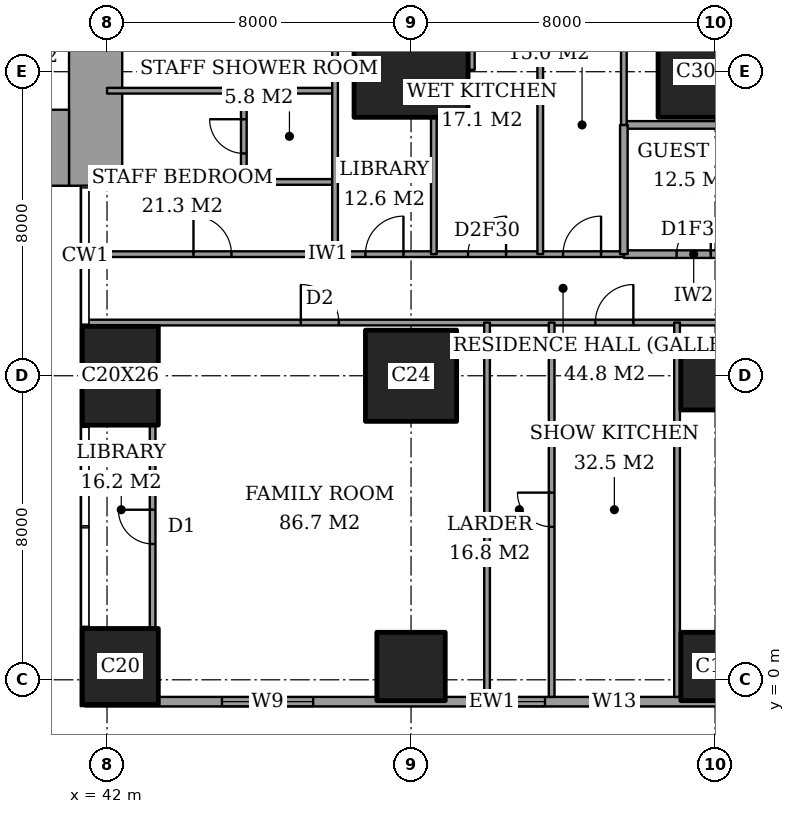
"""IFC4 building model, lengths in metres.
Left out: names, types, materials, properties, quantities, classifications, styles, units other than length and angle.
Written with IfcOpenShell. Run it as: python <this file> out.ifc"""

import sys

from ifc_helpers import new_model, si_unit, direction, frame, frame_2d, origin, origin_2d, place, context, subcontext, project, spatial, rectangle, extrude, element, fill, save


model = new_model("IFC4")
c1 = context("Model", 3, precision=1e-05, world=origin(), true_north=direction((0.0, 1.0)))
c2 = subcontext(c1, "Body", "Model", "MODEL_VIEW")
j1 = project(units=[si_unit("LENGTHUNIT", "METRE"), si_unit("PLANEANGLEUNIT", "RADIAN")], contexts=[c1])
p1 = place(None, origin())
s1 = spatial("IfcSite", under=j1, at=p1, CompositionType="ELEMENT")
p2 = place(p1, origin())
s2 = spatial("IfcBuilding", under=s1, at=p2, CompositionType="ELEMENT")
p3 = place(p2, frame((0.0, 0.0, 185.8)))
s3 = spatial("IfcBuildingStorey", under=s2, at=p3, CompositionType="ELEMENT", Elevation=185.8)
p4 = place(p3, frame((42.35, 0.35, 0.0), z_axis=(0.0, 0.0, 1.0), x_axis=(1.0, 0.0, 0.0)))
e1 = element("IfcColumn", 1, at=p4, inside=s3, PredefinedType="COLUMN", context=c2, shape_type="SweptSolid", body=[
    extrude(rectangle(XDim=2.0, YDim=2.0, at=origin_2d()), origin(), (0.0, 0.0, 1.0), 3.6),
])
p5 = place(p3, frame((42.35, 8.0, 0.0), z_axis=(0.0, 0.0, 1.0), x_axis=(1.0, 0.0, 0.0)))
e2 = element("IfcColumn", 2, at=p5, inside=s3, PredefinedType="COLUMN", context=c2, shape_type="SweptSolid", body=[
    extrude(rectangle(XDim=2.0, YDim=2.6, at=origin_2d()), origin(), (0.0, 0.0, 1.0), 3.6),
])
p6 = place(p3, frame((50.0, 0.35, 0.0), z_axis=(0.0, 0.0, 1.0), x_axis=(1.0, 0.0, 0.0)))
e3 = element("IfcColumn", 3, at=p6, inside=s3, PredefinedType="COLUMN", context=c2, shape_type="SweptSolid", body=[
    extrude(rectangle(XDim=1.8, YDim=1.8, at=origin_2d()), origin(), (0.0, 0.0, 1.0), 3.6),
])
p7 = place(p3, frame((50.0, 8.0, 0.0), z_axis=(0.0, 0.0, 1.0), x_axis=(1.0, 0.0, 0.0)))
e4 = element("IfcColumn", 4, at=p7, inside=s3, PredefinedType="COLUMN", context=c2, shape_type="SweptSolid", body=[
    extrude(rectangle(XDim=2.4, YDim=2.4, at=origin_2d()), origin(), (0.0, 0.0, 1.0), 3.6),
])
p8 = place(p3, frame((50.0, 16.0, 0.0), z_axis=(0.0, 0.0, 1.0), x_axis=(1.0, 0.0, 0.0)))
e5 = element("IfcColumn", 5, at=p8, inside=s3, PredefinedType="COLUMN", context=c2, shape_type="SweptSolid", body=[
    extrude(rectangle(XDim=3.0, YDim=2.4, at=origin_2d()), origin(), (0.0, 0.0, 1.0), 3.6),
])
for number, where, z_axis, x_axis in (
    (6, (58.0, 0.35, 0.0), (0.0, 0.0, 1.0), (1.0, 0.0, 0.0)),
    (7, (58.0, 8.0, 0.0), (0.0, 0.0, 1.0), (1.0, 0.0, 0.0)),
):
    element("IfcColumn", number, at=place(p3, frame(where, z_axis=z_axis, x_axis=x_axis)), inside=s3, PredefinedType="COLUMN", context=c2, shape_type="SweptSolid", body=[
        extrude(rectangle(XDim=1.8, YDim=1.8, at=origin_2d()), origin(), (0.0, 0.0, 1.0), 3.6),
    ])
p9 = place(p3, frame((58.0, 16.0, 0.0), z_axis=(0.0, 0.0, 1.0), x_axis=(1.0, 0.0, 0.0)))
e8 = element("IfcColumn", 8, at=p9, inside=s3, PredefinedType="COLUMN", context=c2, shape_type="SweptSolid", body=[
    extrude(rectangle(XDim=3.0, YDim=2.4, at=origin_2d()), origin(), (0.0, 0.0, 1.0), 3.6),
])
p10 = place(p3, frame((37.85, 14.0, 0.0), z_axis=(0.0, 0.0, 1.0), x_axis=(1.0, 0.0, 0.0)))
e9 = element("IfcWall", 9, at=p10, inside=s3, PredefinedType="SHEAR", context=c2, shape_type="SweptSolid", body=[
    extrude(rectangle(XDim=3.15, YDim=2.0, at=frame_2d((1.575, 0.0))), origin(), (0.0, 0.0, 1.0), 3.6),
])
p11 = place(p3, frame((41.7, 13.0, 0.0), z_axis=(0.0, 0.0, 1.0), x_axis=(0.0, 1.0, 0.0)))
e10 = element("IfcWall", 10, at=p11, inside=s3, PredefinedType="SHEAR", context=c2, shape_type="SweptSolid", body=[
    extrude(rectangle(XDim=11.85, YDim=1.4, at=frame_2d((5.925, 0.0))), origin(), (0.0, 0.0, 1.0), 3.6),
])
p12 = place(p11, frame((7.5, 0.0, 0.0)))
e11 = element("IfcOpeningElement", 11, at=p12, cuts=e10, PredefinedType="OPENING", context=c2, shape_type="SweptSolid", body=[
    extrude(rectangle(XDim=1.8, YDim=2.4, at=frame_2d((0.9, 1.2))), frame((0.0, 0.71, 0.0), z_axis=(0.0, -1.0, 0.0), x_axis=(1.0, 0.0, 0.0)), (0.0, 0.0, 1.0), 1.42),
])
p13 = place(p3, frame((41.425, -0.575, 0.0), z_axis=(0.0, 0.0, 1.0), x_axis=(1.0, 0.0, 0.0)))
e12 = element("IfcWall", 12, at=p13, inside=s3, PredefinedType="SOLIDWALL", context=c2, shape_type="SweptSolid", body=[
    extrude(rectangle(XDim=21.4, YDim=0.25, at=frame_2d((10.7, 0.0))), origin(), (0.0, 0.0, 1.0), 3.6),
])
p14 = place(p13, frame((3.6, 0.0, 0.2)))
e13 = element("IfcOpeningElement", 13, at=p14, cuts=e12, PredefinedType="OPENING", context=c2, shape_type="SweptSolid", body=[
    extrude(rectangle(XDim=2.4, YDim=2.4, at=frame_2d((1.2, 1.2))), frame((0.0, 0.135, 0.0), z_axis=(0.0, -1.0, 0.0), x_axis=(1.0, 0.0, 0.0)), (0.0, 0.0, 1.0), 0.27),
])
p15 = place(p13, frame((10.9, 0.0, 0.2)))
e14 = element("IfcOpeningElement", 14, at=p15, cuts=e12, PredefinedType="OPENING", context=c2, shape_type="SweptSolid", body=[
    extrude(rectangle(XDim=1.2, YDim=2.4, at=frame_2d((0.6, 1.2))), frame((0.0, 0.135, 0.0), z_axis=(0.0, -1.0, 0.0), x_axis=(1.0, 0.0, 0.0)), (0.0, 0.0, 1.0), 0.27),
])
p16 = place(p13, frame((13.325, 0.0, 0.2)))
e15 = element("IfcOpeningElement", 15, at=p16, cuts=e12, PredefinedType="OPENING", context=c2, shape_type="SweptSolid", body=[
    extrude(rectangle(XDim=1.2, YDim=2.4, at=frame_2d((0.6, 1.2))), frame((0.0, 0.135, 0.0), z_axis=(0.0, -1.0, 0.0), x_axis=(1.0, 0.0, 0.0)), (0.0, 0.0, 1.0), 0.27),
])
p17 = place(p13, frame((18.175, 0.0, 0.2)))
e16 = element("IfcOpeningElement", 16, at=p17, cuts=e12, PredefinedType="OPENING", context=c2, shape_type="SweptSolid", body=[
    extrude(rectangle(XDim=2.4, YDim=2.4, at=frame_2d((1.2, 1.2))), frame((0.0, 0.135, 0.0), z_axis=(0.0, -1.0, 0.0), x_axis=(1.0, 0.0, 0.0)), (0.0, 0.0, 1.0), 0.27),
])
p18 = place(p3, frame((41.439, 9.4, 0.0), z_axis=(0.0, 0.0, 1.0), x_axis=(1.0, 0.0, 0.0)))
e17 = element("IfcWall", 17, at=p18, inside=s3, PredefinedType="PARTITIONING", context=c2, shape_type="SweptSolid", body=[
    extrude(rectangle(XDim=25.011, YDim=0.15, at=frame_2d((12.505, 0.0))), origin(), (0.0, 0.0, 1.0), 3.35),
])
p19 = place(p18, frame((19.786, 0.0, 0.0)))
e18 = element("IfcOpeningElement", 18, at=p19, cuts=e17, PredefinedType="OPENING", context=c2, shape_type="SweptSolid", body=[
    extrude(rectangle(XDim=1.0, YDim=2.1, at=frame_2d((0.5, 1.05))), frame((0.0, 0.085, 0.0), z_axis=(0.0, -1.0, 0.0), x_axis=(1.0, 0.0, 0.0)), (0.0, 0.0, 1.0), 0.17),
])
p20 = place(p18, frame((13.411, 0.0, 0.0)))
e19 = element("IfcOpeningElement", 19, at=p20, cuts=e17, PredefinedType="OPENING", context=c2, shape_type="SweptSolid", body=[
    extrude(rectangle(XDim=1.0, YDim=2.1, at=frame_2d((0.5, 1.05))), frame((0.0, 0.085, 0.0), z_axis=(0.0, -1.0, 0.0), x_axis=(1.0, 0.0, 0.0)), (0.0, 0.0, 1.0), 0.17),
])
p21 = place(p18, frame((5.661, 0.0, 0.0)))
e20 = element("IfcOpeningElement", 20, at=p21, cuts=e17, PredefinedType="OPENING", context=c2, shape_type="SweptSolid", body=[
    extrude(rectangle(XDim=1.0, YDim=2.1, at=frame_2d((0.5, 1.05))), frame((0.0, 0.085, 0.0), z_axis=(0.0, -1.0, 0.0), x_axis=(1.0, 0.0, 0.0)), (0.0, 0.0, 1.0), 0.17),
])
p22 = place(p3, frame((55.6, 11.2, 0.0), z_axis=(0.0, 0.0, 1.0), x_axis=(1.0, 0.0, 0.0)))
e21 = element("IfcWall", 21, at=p22, inside=s3, PredefinedType="PARTITIONING", context=c2, shape_type="SweptSolid", body=[
    extrude(rectangle(XDim=3.675, YDim=0.2, at=frame_2d((1.837, 0.0))), origin(), (0.0, 0.0, 1.0), 3.35),
])
p23 = place(p22, frame((1.387, 0.0, 0.0)))
e22 = element("IfcOpeningElement", 22, at=p23, cuts=e21, PredefinedType="OPENING", context=c2, shape_type="SweptSolid", body=[
    extrude(rectangle(XDim=0.9, YDim=2.1, at=frame_2d((0.45, 1.05))), frame((0.0, 0.11, 0.0), z_axis=(0.0, -1.0, 0.0), x_axis=(1.0, 0.0, 0.0)), (0.0, 0.0, 1.0), 0.22),
])
p24 = place(p3, frame((41.439, 11.2, 0.0), z_axis=(0.0, 0.0, 1.0), x_axis=(1.0, 0.0, 0.0)))
e23 = element("IfcWall", 23, at=p24, inside=s3, PredefinedType="PARTITIONING", context=c2, shape_type="SweptSolid", body=[
    extrude(rectangle(XDim=14.161, YDim=0.15, at=frame_2d((7.081, 0.0))), origin(), (0.0, 0.0, 1.0), 3.35),
])
p25 = place(p24, frame((12.561, 0.0, 0.0)))
e24 = element("IfcOpeningElement", 24, at=p25, cuts=e23, PredefinedType="OPENING", context=c2, shape_type="SweptSolid", body=[
    extrude(rectangle(XDim=1.0, YDim=2.1, at=frame_2d((0.5, 1.05))), frame((0.0, 0.085, 0.0), z_axis=(0.0, -1.0, 0.0), x_axis=(1.0, 0.0, 0.0)), (0.0, 0.0, 1.0), 0.17),
])
p26 = place(p24, frame((10.061, 0.0, 0.0)))
e25 = element("IfcOpeningElement", 25, at=p26, cuts=e23, PredefinedType="OPENING", context=c2, shape_type="SweptSolid", body=[
    extrude(rectangle(XDim=1.0, YDim=2.1, at=frame_2d((0.5, 1.05))), frame((0.0, 0.085, 0.0), z_axis=(0.0, -1.0, 0.0), x_axis=(1.0, 0.0, 0.0)), (0.0, 0.0, 1.0), 0.17),
])
p27 = place(p24, frame((7.361, 0.0, 0.0)))
e26 = element("IfcOpeningElement", 26, at=p27, cuts=e23, PredefinedType="OPENING", context=c2, shape_type="SweptSolid", body=[
    extrude(rectangle(XDim=1.0, YDim=2.1, at=frame_2d((0.5, 1.05))), frame((0.0, 0.085, 0.0), z_axis=(0.0, -1.0, 0.0), x_axis=(1.0, 0.0, 0.0)), (0.0, 0.0, 1.0), 0.17),
])
p28 = place(p24, frame((2.836, 0.0, 0.0)))
e27 = element("IfcOpeningElement", 27, at=p28, cuts=e23, PredefinedType="OPENING", context=c2, shape_type="SweptSolid", body=[
    extrude(rectangle(XDim=1.0, YDim=2.1, at=frame_2d((0.5, 1.05))), frame((0.0, 0.085, 0.0), z_axis=(0.0, -1.0, 0.0), x_axis=(1.0, 0.0, 0.0)), (0.0, 0.0, 1.0), 0.17),
])
p29 = place(p3, frame((45.6, 13.1, 0.0), z_axis=(0.0, 0.0, 1.0), x_axis=(1.0, 0.0, 0.0)))
e28 = element("IfcWall", 28, at=p29, inside=s3, PredefinedType="PARTITIONING", context=c2, shape_type="SweptSolid", body=[
    extrude(rectangle(XDim=2.4, YDim=0.15, at=frame_2d((1.2, 0.0))), origin(), (0.0, 0.0, 1.0), 3.35),
])
p30 = place(p3, frame((55.6, 14.6, 0.0), z_axis=(0.0, 0.0, 1.0), x_axis=(1.0, 0.0, 0.0)))
e29 = element("IfcWall", 29, at=p30, inside=s3, PredefinedType="PARTITIONING", context=c2, shape_type="SweptSolid", body=[
    extrude(rectangle(XDim=3.675, YDim=0.2, at=frame_2d((1.837, 0.0))), origin(), (0.0, 0.0, 1.0), 3.35),
])
p31 = place(p3, frame((42.0, 15.5, 0.0), z_axis=(0.0, 0.0, 1.0), x_axis=(1.0, 0.0, 0.0)))
e30 = element("IfcWall", 30, at=p31, inside=s3, PredefinedType="PARTITIONING", context=c2, shape_type="SweptSolid", body=[
    extrude(rectangle(XDim=6.0, YDim=0.15, at=frame_2d((3.0, 0.0))), origin(), (0.0, 0.0, 1.0), 3.35),
])
p32 = place(p3, frame((48.0, 16.05, 0.0), z_axis=(0.0, 0.0, 1.0), x_axis=(1.0, 0.0, 0.0)))
e31 = element("IfcWall", 31, at=p32, inside=s3, PredefinedType="PARTITIONING", context=c2, shape_type="SweptSolid", body=[
    extrude(rectangle(XDim=0.5, YDim=0.15, at=frame_2d((0.25, 0.0))), origin(), (0.0, 0.0, 1.0), 2.634),
])
p33 = place(p3, frame((43.2, 1.35, 0.0), z_axis=(0.0, 0.0, 1.0), x_axis=(0.0, 1.0, 0.0)))
e32 = element("IfcWall", 32, at=p33, inside=s3, PredefinedType="PARTITIONING", context=c2, shape_type="SweptSolid", body=[
    extrude(rectangle(XDim=5.35, YDim=0.15, at=frame_2d((2.675, 0.0))), origin(), (0.0, 0.0, 1.0), 3.35),
])
p34 = place(p33, frame((2.225, 0.0, 0.0)))
e33 = element("IfcOpeningElement", 33, at=p34, cuts=e32, PredefinedType="OPENING", context=c2, shape_type="SweptSolid", body=[
    extrude(rectangle(XDim=0.9, YDim=2.1, at=frame_2d((0.45, 1.05))), frame((0.0, 0.085, 0.0), z_axis=(0.0, -1.0, 0.0), x_axis=(1.0, 0.0, 0.0)), (0.0, 0.0, 1.0), 0.17),
])
p35 = place(p3, frame((45.6, 13.1, 0.0), z_axis=(0.0, 0.0, 1.0), x_axis=(0.0, 1.0, 0.0)))
e34 = element("IfcWall", 34, at=p35, inside=s3, PredefinedType="PARTITIONING", context=c2, shape_type="SweptSolid", body=[
    extrude(rectangle(XDim=2.4, YDim=0.15, at=frame_2d((1.2, 0.0))), origin(), (0.0, 0.0, 1.0), 3.35),
])
p36 = place(p35, frame((0.75, 0.0, 0.0)))
e35 = element("IfcOpeningElement", 35, at=p36, cuts=e34, PredefinedType="OPENING", context=c2, shape_type="SweptSolid", body=[
    extrude(rectangle(XDim=0.9, YDim=2.1, at=frame_2d((0.45, 1.05))), frame((0.0, 0.085, 0.0), z_axis=(0.0, -1.0, 0.0), x_axis=(1.0, 0.0, 0.0)), (0.0, 0.0, 1.0), 0.17),
])
p37 = place(p3, frame((48.0, 11.2, 0.0), z_axis=(0.0, 0.0, 1.0), x_axis=(0.0, 1.0, 0.0)))
e36 = element("IfcWall", 36, at=p37, inside=s3, PredefinedType="PARTITIONING", context=c2, shape_type="SweptSolid", body=[
    extrude(rectangle(XDim=6.8, YDim=0.15, at=frame_2d((3.4, 0.0))), origin(), (0.0, 0.0, 1.0), 3.35),
])
p38 = place(p3, frame((50.6, 11.2, 0.0), z_axis=(0.0, 0.0, 1.0), x_axis=(0.0, 1.0, 0.0)))
e37 = element("IfcWall", 37, at=p38, inside=s3, PredefinedType="PARTITIONING", context=c2, shape_type="SweptSolid", body=[
    extrude(rectangle(XDim=3.6, YDim=0.15, at=frame_2d((1.8, 0.0))), origin(), (0.0, 0.0, 1.0), 3.35),
])
p39 = place(p3, frame((51.6, 16.05, 0.0), z_axis=(0.0, 0.0, 1.0), x_axis=(0.0, 1.0, 0.0)))
e38 = element("IfcWall", 38, at=p39, inside=s3, PredefinedType="PARTITIONING", context=c2, shape_type="SweptSolid", body=[
    extrude(rectangle(XDim=1.95, YDim=0.15, at=frame_2d((0.975, 0.0))), origin(), (0.0, 0.0, 1.0), 3.35),
])
p40 = place(p3, frame((52.0, -0.45, 0.0), z_axis=(0.0, 0.0, 1.0), x_axis=(0.0, 1.0, 0.0)))
e39 = element("IfcWall", 39, at=p40, inside=s3, PredefinedType="PARTITIONING", context=c2, shape_type="SweptSolid", body=[
    extrude(rectangle(XDim=9.85, YDim=0.15, at=frame_2d((4.925, 0.0))), origin(), (0.0, 0.0, 1.0), 3.35),
])
p41 = place(p3, frame((53.4, 11.2, 0.0), z_axis=(0.0, 0.0, 1.0), x_axis=(0.0, 1.0, 0.0)))
e40 = element("IfcWall", 40, at=p41, inside=s3, PredefinedType="PARTITIONING", context=c2, shape_type="SweptSolid", body=[
    extrude(rectangle(XDim=6.8, YDim=0.15, at=frame_2d((3.4, 0.0))), origin(), (0.0, 0.0, 1.0), 3.35),
])
p42 = place(p3, frame((53.7, -0.45, 0.0), z_axis=(0.0, 0.0, 1.0), x_axis=(0.0, 1.0, 0.0)))
e41 = element("IfcWall", 41, at=p42, inside=s3, PredefinedType="PARTITIONING", context=c2, shape_type="SweptSolid", body=[
    extrude(rectangle(XDim=9.85, YDim=0.15, at=frame_2d((4.925, 0.0))), origin(), (0.0, 0.0, 1.0), 3.35),
])
p43 = place(p42, frame((4.475, 0.0, 0.0)))
e42 = element("IfcOpeningElement", 42, at=p43, cuts=e41, PredefinedType="OPENING", context=c2, shape_type="SweptSolid", body=[
    extrude(rectangle(XDim=0.9, YDim=2.1, at=frame_2d((0.45, 1.05))), frame((0.0, 0.085, 0.0), z_axis=(0.0, -1.0, 0.0), x_axis=(1.0, 0.0, 0.0)), (0.0, 0.0, 1.0), 0.17),
])
p44 = place(p3, frame((55.6, 11.2, 0.0), z_axis=(0.0, 0.0, 1.0), x_axis=(0.0, 1.0, 0.0)))
e43 = element("IfcWall", 43, at=p44, inside=s3, PredefinedType="PARTITIONING", context=c2, shape_type="SweptSolid", body=[
    extrude(rectangle(XDim=3.4, YDim=0.2, at=frame_2d((1.7, 0.0))), origin(), (0.0, 0.0, 1.0), 3.35),
])
p45 = place(p3, frame((55.6, 14.6, 0.0), z_axis=(0.0, 0.0, 1.0), x_axis=(0.0, 1.0, 0.0)))
e44 = element("IfcWall", 44, at=p45, inside=s3, PredefinedType="PARTITIONING", context=c2, shape_type="SweptSolid", body=[
    extrude(rectangle(XDim=7.0, YDim=0.15, at=frame_2d((3.5, 0.0))), origin(), (0.0, 0.0, 1.0), 3.35),
])
p46 = place(p45, frame((4.7, 0.0, 0.0)))
e45 = element("IfcOpeningElement", 45, at=p46, cuts=e44, PredefinedType="OPENING", context=c2, shape_type="SweptSolid", body=[
    extrude(rectangle(XDim=1.0, YDim=2.1, at=frame_2d((0.5, 1.05))), frame((0.0, 0.085, 0.0), z_axis=(0.0, -1.0, 0.0), x_axis=(1.0, 0.0, 0.0)), (0.0, 0.0, 1.0), 0.17),
])
p47 = place(p3, frame((57.0, -0.45, 0.0), z_axis=(0.0, 0.0, 1.0), x_axis=(0.0, 1.0, 0.0)))
e46 = element("IfcWall", 46, at=p47, inside=s3, PredefinedType="PARTITIONING", context=c2, shape_type="SweptSolid", body=[
    extrude(rectangle(XDim=9.85, YDim=0.15, at=frame_2d((4.925, 0.0))), origin(), (0.0, 0.0, 1.0), 3.35),
])
p48 = place(p14, origin())
e47 = element("IfcWindow", 47, at=p48, inside=s3, PartitioningType="SINGLE_PANEL", PredefinedType="WINDOW", context=c2, shape_type="SweptSolid", body=[
    extrude(rectangle(XDim=2.4, YDim=2.4, at=frame_2d((1.2, 1.2))), frame((0.0, 0.03, 0.0), z_axis=(0.0, -1.0, 0.0), x_axis=(1.0, 0.0, 0.0)), (0.0, 0.0, 1.0), 0.06),
])
fill(e13, e47)
p49 = place(p15, origin())
e48 = element("IfcWindow", 48, at=p49, inside=s3, PartitioningType="SINGLE_PANEL", PredefinedType="WINDOW", context=c2, shape_type="SweptSolid", body=[
    extrude(rectangle(XDim=1.2, YDim=2.4, at=frame_2d((0.6, 1.2))), frame((0.0, 0.03, 0.0), z_axis=(0.0, -1.0, 0.0), x_axis=(1.0, 0.0, 0.0)), (0.0, 0.0, 1.0), 0.06),
])
fill(e14, e48)
p50 = place(p16, origin())
e49 = element("IfcWindow", 49, at=p50, inside=s3, PartitioningType="SINGLE_PANEL", PredefinedType="WINDOW", context=c2, shape_type="SweptSolid", body=[
    extrude(rectangle(XDim=1.2, YDim=2.4, at=frame_2d((0.6, 1.2))), frame((0.0, 0.03, 0.0), z_axis=(0.0, -1.0, 0.0), x_axis=(1.0, 0.0, 0.0)), (0.0, 0.0, 1.0), 0.06),
])
fill(e15, e49)
p51 = place(p20, origin())
e50 = element("IfcDoor", 50, at=p51, inside=s3, OperationType="SINGLE_SWING_LEFT", PredefinedType="DOOR", context=c2, shape_type="SweptSolid", body=[
    extrude(rectangle(XDim=1.0, YDim=2.1, at=frame_2d((0.5, 1.05))), frame((0.0, 0.025, 0.0), z_axis=(0.0, -1.0, 0.0), x_axis=(1.0, 0.0, 0.0)), (0.0, 0.0, 1.0), 0.05),
])
fill(e19, e50)
p52 = place(p43, origin())
e51 = element("IfcDoor", 51, at=p52, inside=s3, OperationType="SINGLE_SWING_LEFT", PredefinedType="DOOR", context=c2, shape_type="SweptSolid", body=[
    extrude(rectangle(XDim=0.9, YDim=2.1, at=frame_2d((0.45, 1.05))), frame((0.0, 0.025, 0.0), z_axis=(0.0, -1.0, 0.0), x_axis=(1.0, 0.0, 0.0)), (0.0, 0.0, 1.0), 0.05),
])
fill(e42, e51)
p53 = place(p21, origin())
e52 = element("IfcDoor", 52, at=p53, inside=s3, OperationType="SINGLE_SWING_RIGHT", PredefinedType="DOOR", context=c2, shape_type="SweptSolid", body=[
    extrude(rectangle(XDim=1.0, YDim=2.1, at=frame_2d((0.5, 1.05))), frame((0.0, 0.025, 0.0), z_axis=(0.0, -1.0, 0.0), x_axis=(1.0, 0.0, 0.0)), (0.0, 0.0, 1.0), 0.05),
])
fill(e20, e52)
p54 = place(p34, origin())
e53 = element("IfcDoor", 53, at=p54, inside=s3, OperationType="SINGLE_SWING_LEFT", PredefinedType="DOOR", context=c2, shape_type="SweptSolid", body=[
    extrude(rectangle(XDim=0.9, YDim=2.1, at=frame_2d((0.45, 1.05))), frame((0.0, 0.025, 0.0), z_axis=(0.0, -1.0, 0.0), x_axis=(1.0, 0.0, 0.0)), (0.0, 0.0, 1.0), 0.05),
])
fill(e33, e53)
p55 = place(p25, origin())
e54 = element("IfcDoor", 54, at=p55, inside=s3, OperationType="SINGLE_SWING_LEFT", PredefinedType="DOOR", context=c2, shape_type="SweptSolid", body=[
    extrude(rectangle(XDim=1.0, YDim=2.1, at=frame_2d((0.5, 1.05))), frame((0.0, 0.025, 0.0), z_axis=(0.0, -1.0, 0.0), x_axis=(1.0, 0.0, 0.0)), (0.0, 0.0, 1.0), 0.05),
])
fill(e24, e54)
p56 = place(p23, origin())
e55 = element("IfcDoor", 55, at=p56, inside=s3, OperationType="SINGLE_SWING_LEFT", PredefinedType="DOOR", context=c2, shape_type="SweptSolid", body=[
    extrude(rectangle(XDim=0.9, YDim=2.1, at=frame_2d((0.45, 1.05))), frame((0.0, 0.025, 0.0), z_axis=(0.0, -1.0, 0.0), x_axis=(1.0, 0.0, 0.0)), (0.0, 0.0, 1.0), 0.05),
])
fill(e22, e55)
p57 = place(p26, origin())
e56 = element("IfcDoor", 56, at=p57, inside=s3, OperationType="SINGLE_SWING_LEFT", PredefinedType="DOOR", context=c2, shape_type="SweptSolid", body=[
    extrude(rectangle(XDim=1.0, YDim=2.1, at=frame_2d((0.5, 1.05))), frame((0.0, 0.025, 0.0), z_axis=(0.0, -1.0, 0.0), x_axis=(1.0, 0.0, 0.0)), (0.0, 0.0, 1.0), 0.05),
])
fill(e25, e56)
p58 = place(p27, origin())
e57 = element("IfcDoor", 57, at=p58, inside=s3, OperationType="SINGLE_SWING_LEFT", PredefinedType="DOOR", context=c2, shape_type="SweptSolid", body=[
    extrude(rectangle(XDim=1.0, YDim=2.1, at=frame_2d((0.5, 1.05))), frame((0.0, 0.025, 0.0), z_axis=(0.0, -1.0, 0.0), x_axis=(1.0, 0.0, 0.0)), (0.0, 0.0, 1.0), 0.05),
])
fill(e26, e57)
p59 = place(p36, origin())
e58 = element("IfcDoor", 58, at=p59, inside=s3, OperationType="SINGLE_SWING_LEFT", PredefinedType="DOOR", context=c2, shape_type="SweptSolid", body=[
    extrude(rectangle(XDim=0.9, YDim=2.1, at=frame_2d((0.45, 1.05))), frame((0.0, 0.025, 0.0), z_axis=(0.0, -1.0, 0.0), x_axis=(1.0, 0.0, 0.0)), (0.0, 0.0, 1.0), 0.05),
])
fill(e35, e58)
p60 = place(p28, origin())
e59 = element("IfcDoor", 59, at=p60, inside=s3, OperationType="SINGLE_SWING_RIGHT", PredefinedType="DOOR", context=c2, shape_type="SweptSolid", body=[
    extrude(rectangle(XDim=1.0, YDim=2.1, at=frame_2d((0.5, 1.05))), frame((0.0, 0.025, 0.0), z_axis=(0.0, -1.0, 0.0), x_axis=(1.0, 0.0, 0.0)), (0.0, 0.0, 1.0), 0.05),
])
fill(e27, e59)
save(model, sys.argv[1])
